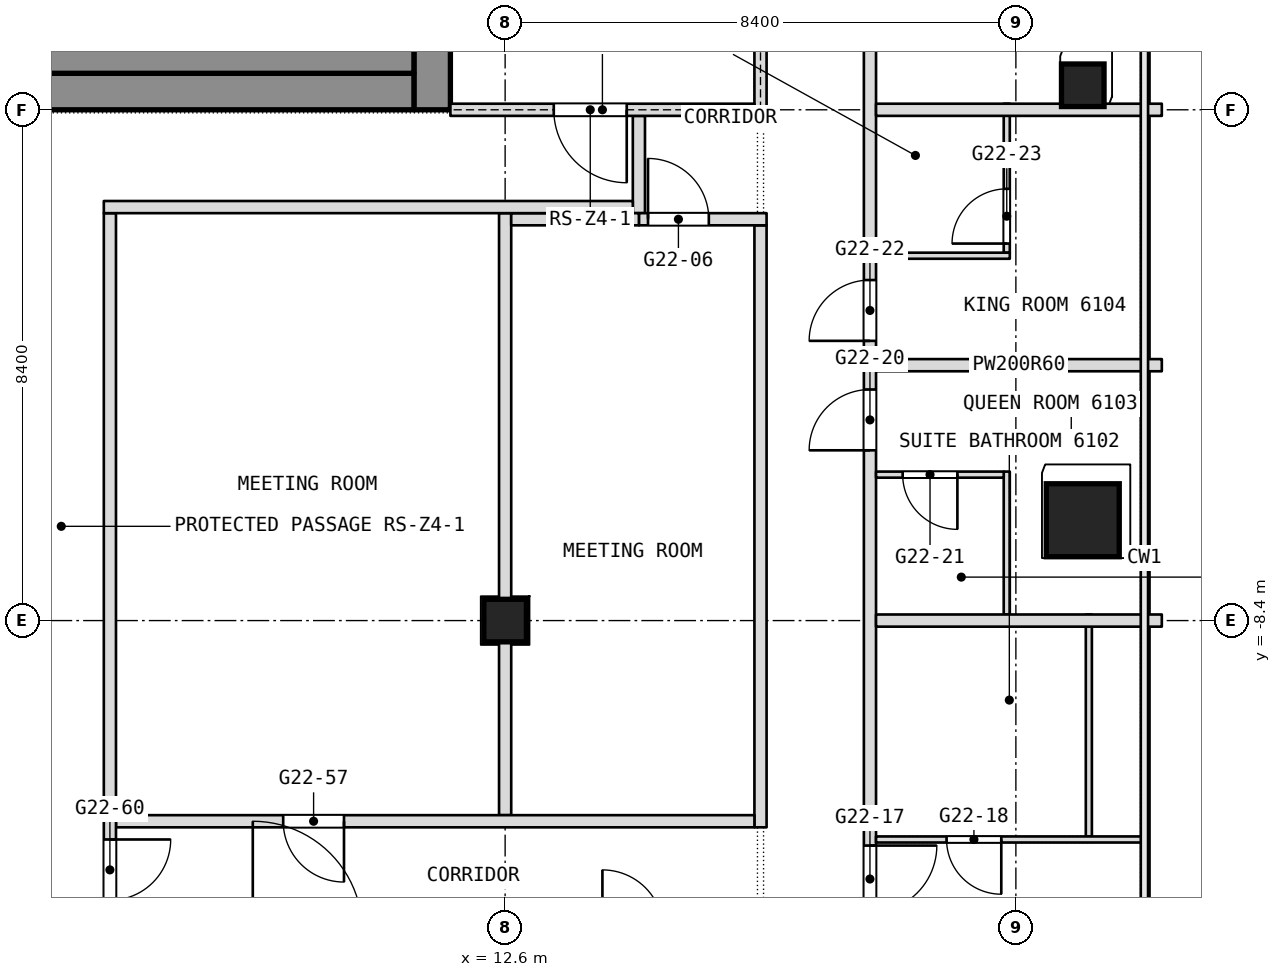
"""IFC4 building model, lengths in metres.
Left out: names, types, materials, properties, quantities, classifications, styles, units other than length and angle.
Written with IfcOpenShell. Run it as: python <this file> out.ifc"""

import sys

from ifc_helpers import new_model, si_unit, direction, frame, frame_2d, origin, origin_2d, place, context, subcontext, project, spatial, rectangle, extrude, element, fill, save


model = new_model("IFC4")
c1 = context("Model", 3, precision=1e-05, world=origin(), true_north=direction((0.0, 1.0)))
c2 = subcontext(c1, "Body", "Model", "MODEL_VIEW")
j1 = project(units=[si_unit("LENGTHUNIT", "METRE"), si_unit("PLANEANGLEUNIT", "RADIAN")], contexts=[c1])
p1 = place(None, origin())
s1 = spatial("IfcSite", under=j1, at=p1, CompositionType="ELEMENT")
p2 = place(p1, origin())
s2 = spatial("IfcBuilding", under=s1, at=p2, CompositionType="ELEMENT")
p3 = place(p2, frame((0.0, 0.0, 266.9)))
s3 = spatial("IfcBuildingStorey", under=s2, at=p3, CompositionType="ELEMENT", Elevation=266.9)
p4 = place(p3, frame((11.4, 0.0, 0.0), z_axis=(0.0, 0.0, 1.0), x_axis=(0.0, 1.0, 0.0)))
e1 = element("IfcWall", 1, at=p4, inside=s3, PredefinedType="SHEAR", context=c2, shape_type="SweptSolid", body=[
    extrude(rectangle(XDim=16.8, YDim=0.6, at=frame_2d((8.4, 0.0))), origin(), (0.0, 0.0, 1.0), 3.6),
])
p5 = place(p4, frame((2.3, 0.0, 0.0)))
e2 = element("IfcOpeningElement", 2, at=p5, cuts=e1, PredefinedType="OPENING", context=c2, shape_type="SweptSolid", body=[
    extrude(rectangle(XDim=1.1, YDim=2.1, at=frame_2d((0.55, 1.05))), frame((0.0, 0.3, 0.0), z_axis=(0.0, -1.0, 0.0), x_axis=(1.0, 0.0, 0.0)), (0.0, 0.0, 1.0), 0.6),
])
p6 = place(p4, frame((4.85, 0.0, 0.0)))
e3 = element("IfcOpeningElement", 3, at=p6, cuts=e1, PredefinedType="OPENING", context=c2, shape_type="SweptSolid", body=[
    extrude(rectangle(XDim=1.1, YDim=2.1, at=frame_2d((0.55, 1.05))), frame((0.0, 0.3, 0.0), z_axis=(0.0, -1.0, 0.0), x_axis=(1.0, 0.0, 0.0)), (0.0, 0.0, 1.0), 0.6),
])
p7 = place(p4, frame((6.825, 0.0, 0.0)))
e4 = element("IfcOpeningElement", 4, at=p7, cuts=e1, PredefinedType="OPENING", context=c2, shape_type="SweptSolid", body=[
    extrude(rectangle(XDim=1.2, YDim=2.1, at=frame_2d((0.6, 1.05))), frame((0.0, 0.3, 0.0), z_axis=(0.0, -1.0, 0.0), x_axis=(1.0, 0.0, 0.0)), (0.0, 0.0, 1.0), 0.6),
])
p8 = place(p4, frame((13.4, 0.0, 0.0)))
e5 = element("IfcOpeningElement", 5, at=p8, cuts=e1, PredefinedType="OPENING", context=c2, shape_type="SweptSolid", body=[
    extrude(rectangle(XDim=1.1, YDim=2.1, at=frame_2d((0.55, 1.05))), frame((0.0, 0.3, 0.0), z_axis=(0.0, -1.0, 0.0), x_axis=(1.0, 0.0, 0.0)), (0.0, 0.0, 1.0), 0.6),
])
p9 = place(p4, frame((10.85, 0.0, 0.0)))
e6 = element("IfcOpeningElement", 6, at=p9, cuts=e1, PredefinedType="OPENING", context=c2, shape_type="SweptSolid", body=[
    extrude(rectangle(XDim=1.1, YDim=2.1, at=frame_2d((0.55, 1.05))), frame((0.0, 0.3, 0.0), z_axis=(0.0, -1.0, 0.0), x_axis=(1.0, 0.0, 0.0)), (0.0, 0.0, 1.0), 0.6),
])
p10 = place(p4, frame((8.775, 0.0, 0.0)))
e7 = element("IfcOpeningElement", 7, at=p10, cuts=e1, PredefinedType="OPENING", context=c2, shape_type="SweptSolid", body=[
    extrude(rectangle(XDim=1.2, YDim=2.1, at=frame_2d((0.6, 1.05))), frame((0.0, 0.3, 0.0), z_axis=(0.0, -1.0, 0.0), x_axis=(1.0, 0.0, 0.0)), (0.0, 0.0, 1.0), 0.6),
])
p11 = place(p3, frame((-11.1, 0.3, 0.0), z_axis=(0.0, 0.0, 1.0), x_axis=(1.0, 0.0, 0.0)))
e8 = element("IfcWall", 8, at=p11, inside=s3, PredefinedType="SHEAR", context=c2, shape_type="SweptSolid", body=[
    extrude(rectangle(XDim=22.2, YDim=0.6, at=frame_2d((11.1, 0.0))), origin(), (0.0, 0.0, 1.0), 3.6),
])
p12 = place(p3, frame((22.1, -6.75, 0.0), z_axis=(0.0, 0.0, 1.0), x_axis=(1.0, 0.0, 0.0)))
e9 = element("IfcColumn", 9, at=p12, inside=s3, PredefinedType="COLUMN", context=c2, shape_type="SweptSolid", body=[
    extrude(rectangle(XDim=1.2, YDim=1.2, at=origin_2d()), origin(), (0.0, 0.0, 1.0), 3.6),
])
for number, where, z_axis, x_axis in (
    (10, (12.6, -8.4, 0.0), (0.0, 0.0, 1.0), (1.0, 0.0, 0.0)),
    (11, (22.1, 0.403, 0.0), (0.0, 0.0, 1.0), (1.0, 0.0, 0.0)),
):
    element("IfcColumn", number, at=place(p3, frame(where, z_axis=z_axis, x_axis=x_axis)), inside=s3, PredefinedType="COLUMN", context=c2, shape_type="SweptSolid", body=[
        extrude(rectangle(XDim=0.7, YDim=0.7, at=origin_2d()), origin(), (0.0, 0.0, 1.0), 3.6),
    ])
p13 = place(p3, frame((22.2, -11.95, 0.0), z_axis=(0.0, 0.0, 1.0), x_axis=(0.0, 1.0, 0.0)))
e12 = element("IfcWall", 12, at=p13, inside=s3, PredefinedType="PARTITIONING", context=c2, shape_type="SweptSolid", body=[
    extrude(rectangle(XDim=3.65, YDim=0.1, at=frame_2d((1.825, 0.0))), origin(), (0.0, 0.0, 1.0), 3.34),
])
p14 = place(p3, frame((20.85, -8.3, 0.0), z_axis=(0.0, 0.0, 1.0), x_axis=(0.0, 1.0, 0.0)))
e13 = element("IfcWall", 13, at=p14, inside=s3, PredefinedType="PARTITIONING", context=c2, shape_type="SweptSolid", body=[
    extrude(rectangle(XDim=2.35, YDim=0.1, at=frame_2d((1.175, 0.0))), origin(), (0.0, 0.0, 1.0), 3.34),
])
p15 = place(p3, frame((20.85, -2.35, 0.0), z_axis=(0.0, 0.0, 1.0), x_axis=(0.0, 1.0, 0.0)))
e14 = element("IfcWall", 14, at=p15, inside=s3, PredefinedType="PARTITIONING", context=c2, shape_type="SweptSolid", body=[
    extrude(rectangle(XDim=2.45, YDim=0.1, at=frame_2d((1.225, 0.0))), origin(), (0.0, 0.0, 1.0), 3.34),
])
p16 = place(p15, frame((0.15, 0.0, 0.0)))
e15 = element("IfcOpeningElement", 15, at=p16, cuts=e14, PredefinedType="OPENING", context=c2, shape_type="SweptSolid", body=[
    extrude(rectangle(XDim=0.9, YDim=2.1, at=frame_2d((0.45, 1.05))), frame((0.0, 0.05, 0.0), z_axis=(0.0, -1.0, 0.0), x_axis=(1.0, 0.0, 0.0)), (0.0, 0.0, 1.0), 0.1),
])
p17 = place(p3, frame((18.6, -31.794, 0.0), z_axis=(0.0, 0.0, 1.0), x_axis=(0.0, 1.0, 0.0)))
e16 = element("IfcWall", 16, at=p17, inside=s3, PredefinedType="PARTITIONING", context=c2, shape_type="SweptSolid", body=[
    extrude(rectangle(XDim=48.697, YDim=0.2, at=frame_2d((24.349, 0.0))), origin(), (0.0, 0.0, 1.0), 3.34),
])
p18 = place(p17, frame((7.097, 0.0, 0.0)))
e17 = element("IfcOpeningElement", 17, at=p18, cuts=e16, PredefinedType="OPENING", context=c2, shape_type="SweptSolid", body=[
    extrude(rectangle(XDim=1.1, YDim=2.1, at=frame_2d((0.55, 1.05))), frame((0.0, 0.1, 0.0), z_axis=(0.0, -1.0, 0.0), x_axis=(1.0, 0.0, 0.0)), (0.0, 0.0, 1.0), 0.2),
])
p19 = place(p17, frame((18.594, 0.0, 0.0)))
e18 = element("IfcOpeningElement", 18, at=p19, cuts=e16, PredefinedType="OPENING", context=c2, shape_type="SweptSolid", body=[
    extrude(rectangle(XDim=1.1, YDim=2.1, at=frame_2d((0.55, 1.05))), frame((0.0, 0.1, 0.0), z_axis=(0.0, -1.0, 0.0), x_axis=(1.0, 0.0, 0.0)), (0.0, 0.0, 1.0), 0.2),
])
p20 = place(p17, frame((26.194, 0.0, 0.0)))
e19 = element("IfcOpeningElement", 19, at=p20, cuts=e16, PredefinedType="OPENING", context=c2, shape_type="SweptSolid", body=[
    extrude(rectangle(XDim=1.0, YDim=2.1, at=frame_2d((0.5, 1.05))), frame((0.0, 0.1, 0.0), z_axis=(0.0, -1.0, 0.0), x_axis=(1.0, 0.0, 0.0)), (0.0, 0.0, 1.0), 0.2),
])
p21 = place(p17, frame((27.994, 0.0, 0.0)))
e20 = element("IfcOpeningElement", 20, at=p21, cuts=e16, PredefinedType="OPENING", context=c2, shape_type="SweptSolid", body=[
    extrude(rectangle(XDim=1.0, YDim=2.1, at=frame_2d((0.5, 1.05))), frame((0.0, 0.1, 0.0), z_axis=(0.0, -1.0, 0.0), x_axis=(1.0, 0.0, 0.0)), (0.0, 0.0, 1.0), 0.2),
])
p22 = place(p17, frame((35.094, 0.0, 0.0)))
e21 = element("IfcOpeningElement", 21, at=p22, cuts=e16, PredefinedType="OPENING", context=c2, shape_type="SweptSolid", body=[
    extrude(rectangle(XDim=1.8, YDim=2.1, at=frame_2d((0.9, 1.05))), frame((0.0, 0.1, 0.0), z_axis=(0.0, -1.0, 0.0), x_axis=(1.0, 0.0, 0.0)), (0.0, 0.0, 1.0), 0.2),
])
p23 = place(p17, frame((43.894, 0.0, 0.0)))
e22 = element("IfcOpeningElement", 22, at=p23, cuts=e16, PredefinedType="OPENING", context=c2, shape_type="SweptSolid", body=[
    extrude(rectangle(XDim=1.1, YDim=2.1, at=frame_2d((0.55, 1.05))), frame((0.0, 0.1, 0.0), z_axis=(0.0, -1.0, 0.0), x_axis=(1.0, 0.0, 0.0)), (0.0, 0.0, 1.0), 0.2),
])
p24 = place(p3, frame((16.8, -11.8, 0.0), z_axis=(0.0, 0.0, 1.0), x_axis=(0.0, 1.0, 0.0)))
e23 = element("IfcWall", 23, at=p24, inside=s3, PredefinedType="PARTITIONING", context=c2, shape_type="SweptSolid", body=[
    extrude(rectangle(XDim=9.9, YDim=0.2, at=frame_2d((4.95, 0.0))), origin(), (0.0, 0.0, 1.0), 3.34),
])
p25 = place(p3, frame((14.8, -1.7, 0.0), z_axis=(0.0, 0.0, 1.0), x_axis=(0.0, 1.0, 0.0)))
e24 = element("IfcWall", 24, at=p25, inside=s3, PredefinedType="PARTITIONING", context=c2, shape_type="SweptSolid", body=[
    extrude(rectangle(XDim=1.6, YDim=0.2, at=frame_2d((0.8, 0.0))), origin(), (0.0, 0.0, 1.0), 3.34),
])
p26 = place(p3, frame((12.6, -11.6, 0.0), z_axis=(0.0, 0.0, 1.0), x_axis=(0.0, 1.0, 0.0)))
e25 = element("IfcWall", 25, at=p26, inside=s3, PredefinedType="PARTITIONING", context=c2, shape_type="SweptSolid", body=[
    extrude(rectangle(XDim=9.9, YDim=0.2, at=frame_2d((4.95, 0.0))), origin(), (0.0, 0.0, 1.0), 3.34),
])
p27 = place(p3, frame((18.7, -12.0, 0.0), z_axis=(0.0, 0.0, 1.0), x_axis=(1.0, 0.0, 0.0)))
e26 = element("IfcWall", 26, at=p27, inside=s3, PredefinedType="PARTITIONING", context=c2, shape_type="SweptSolid", body=[
    extrude(rectangle(XDim=4.384, YDim=0.1, at=frame_2d((2.192, 0.0))), origin(), (0.0, 0.0, 1.0), 3.34),
])
p28 = place(p27, frame((1.16, 0.0, 0.0)))
e27 = element("IfcOpeningElement", 27, at=p28, cuts=e26, PredefinedType="OPENING", context=c2, shape_type="SweptSolid", body=[
    extrude(rectangle(XDim=0.9, YDim=2.1, at=frame_2d((0.45, 1.05))), frame((0.0, 0.05, 0.0), z_axis=(0.0, -1.0, 0.0), x_axis=(1.0, 0.0, 0.0)), (0.0, 0.0, 1.0), 0.1),
])
p29 = place(p3, frame((6.2, -11.7, 0.0), z_axis=(0.0, 0.0, 1.0), x_axis=(1.0, 0.0, 0.0)))
e28 = element("IfcWall", 28, at=p29, inside=s3, PredefinedType="PARTITIONING", context=c2, shape_type="SweptSolid", body=[
    extrude(rectangle(XDim=10.5, YDim=0.2, at=frame_2d((5.25, 0.0))), origin(), (0.0, 0.0, 1.0), 3.34),
])
p30 = place(p29, frame((2.75, 0.0, 0.0)))
e29 = element("IfcOpeningElement", 29, at=p30, cuts=e28, PredefinedType="OPENING", context=c2, shape_type="SweptSolid", body=[
    extrude(rectangle(XDim=1.0, YDim=2.1, at=frame_2d((0.5, 1.05))), frame((0.0, 0.1, 0.0), z_axis=(0.0, -1.0, 0.0), x_axis=(1.0, 0.0, 0.0)), (0.0, 0.0, 1.0), 0.2),
])
p31 = place(p3, frame((18.7, -8.4, 0.0), z_axis=(0.0, 0.0, 1.0), x_axis=(1.0, 0.0, 0.0)))
e30 = element("IfcWall", 30, at=p31, inside=s3, PredefinedType="PARTITIONING", context=c2, shape_type="SweptSolid", body=[
    extrude(rectangle(XDim=4.7, YDim=0.2, at=frame_2d((2.35, 0.0))), origin(), (0.0, 0.0, 1.0), 3.0),
])
p32 = place(p3, frame((6.1, -13.4, 0.0), z_axis=(0.0, 0.0, 1.0), x_axis=(0.0, 1.0, 0.0)))
e31 = element("IfcWall", 31, at=p32, inside=s3, PredefinedType="PARTITIONING", context=c2, shape_type="SweptSolid", body=[
    extrude(rectangle(XDim=1.8, YDim=0.2, at=frame_2d((0.9, 0.0))), origin(), (0.0, 0.0, 1.0), 3.34),
])
p33 = place(p32, frame((0.4, 0.0, 0.0)))
e32 = element("IfcOpeningElement", 32, at=p33, cuts=e31, PredefinedType="OPENING", context=c2, shape_type="SweptSolid", body=[
    extrude(rectangle(XDim=1.0, YDim=2.1, at=frame_2d((0.5, 1.05))), frame((0.0, 0.1, 0.0), z_axis=(0.0, -1.0, 0.0), x_axis=(1.0, 0.0, 0.0)), (0.0, 0.0, 1.0), 0.2),
])
p34 = place(p3, frame((6.1, -11.6, 0.0), z_axis=(0.0, 0.0, 1.0), x_axis=(0.0, 1.0, 0.0)))
e33 = element("IfcWall", 33, at=p34, inside=s3, PredefinedType="PARTITIONING", context=c2, shape_type="SweptSolid", body=[
    extrude(rectangle(XDim=9.9, YDim=0.2, at=frame_2d((4.95, 0.0))), origin(), (0.0, 0.0, 1.0), 3.34),
])
p35 = place(p3, frame((18.7, -6.0, 0.0), z_axis=(0.0, 0.0, 1.0), x_axis=(1.0, 0.0, 0.0)))
e34 = element("IfcWall", 34, at=p35, inside=s3, PredefinedType="PARTITIONING", context=c2, shape_type="SweptSolid", body=[
    extrude(rectangle(XDim=2.1, YDim=0.1, at=frame_2d((1.05, 0.0))), origin(), (0.0, 0.0, 1.0), 3.34),
])
p36 = place(p35, frame((0.438, 0.0, 0.0)))
e35 = element("IfcOpeningElement", 35, at=p36, cuts=e34, PredefinedType="OPENING", context=c2, shape_type="SweptSolid", body=[
    extrude(rectangle(XDim=0.9, YDim=2.1, at=frame_2d((0.45, 1.05))), frame((0.0, 0.05, 0.0), z_axis=(0.0, -1.0, 0.0), x_axis=(1.0, 0.0, 0.0)), (0.0, 0.0, 1.0), 0.1),
])
p37 = place(p3, frame((18.7, -4.2, 0.0), z_axis=(0.0, 0.0, 1.0), x_axis=(1.0, 0.0, 0.0)))
e36 = element("IfcWall", 36, at=p37, inside=s3, PredefinedType="PARTITIONING", context=c2, shape_type="SweptSolid", body=[
    extrude(rectangle(XDim=4.7, YDim=0.2, at=frame_2d((2.35, 0.0))), origin(), (0.0, 0.0, 1.0), 3.34),
])
p38 = place(p3, frame((18.7, -2.4, 0.0), z_axis=(0.0, 0.0, 1.0), x_axis=(1.0, 0.0, 0.0)))
e37 = element("IfcWall", 37, at=p38, inside=s3, PredefinedType="PARTITIONING", context=c2, shape_type="SweptSolid", body=[
    extrude(rectangle(XDim=2.2, YDim=0.1, at=frame_2d((1.1, 0.0))), origin(), (0.0, 0.0, 1.0), 3.34),
])
p39 = place(p3, frame((14.8, -1.8, 0.0), z_axis=(0.0, 0.0, 1.0), x_axis=(1.0, 0.0, 0.0)))
e38 = element("IfcWall", 38, at=p39, inside=s3, PredefinedType="PARTITIONING", context=c2, shape_type="SweptSolid", body=[
    extrude(rectangle(XDim=2.1, YDim=0.2, at=frame_2d((1.05, 0.0))), origin(), (0.0, 0.0, 1.0), 3.34),
])
p40 = place(p39, frame((0.15, 0.0, 0.0)))
e39 = element("IfcOpeningElement", 39, at=p40, cuts=e38, PredefinedType="OPENING", context=c2, shape_type="SweptSolid", body=[
    extrude(rectangle(XDim=1.0, YDim=2.1, at=frame_2d((0.5, 1.05))), frame((0.0, 0.1, 0.0), z_axis=(0.0, -1.0, 0.0), x_axis=(1.0, 0.0, 0.0)), (0.0, 0.0, 1.0), 0.2),
])
p41 = place(p3, frame((12.7, -1.8, 0.0), z_axis=(0.0, 0.0, 1.0), x_axis=(1.0, 0.0, 0.0)))
e40 = element("IfcWall", 40, at=p41, inside=s3, PredefinedType="PARTITIONING", context=c2, shape_type="SweptSolid", body=[
    extrude(rectangle(XDim=2.1, YDim=0.2, at=frame_2d((1.05, 0.0))), origin(), (0.0, 0.0, 1.0), 3.34),
])
p42 = place(p3, frame((6.0, -1.6, 0.0), z_axis=(0.0, 0.0, 1.0), x_axis=(1.0, 0.0, 0.0)))
e41 = element("IfcWall", 41, at=p42, inside=s3, PredefinedType="PARTITIONING", context=c2, shape_type="SweptSolid", body=[
    extrude(rectangle(XDim=8.7, YDim=0.2, at=frame_2d((4.35, 0.0))), origin(), (0.0, 0.0, 1.0), 3.34),
])
p43 = place(p3, frame((18.7, 0.0, 0.0), z_axis=(0.0, 0.0, 1.0), x_axis=(1.0, 0.0, 0.0)))
e42 = element("IfcWall", 42, at=p43, inside=s3, PredefinedType="PARTITIONING", context=c2, shape_type="SweptSolid", body=[
    extrude(rectangle(XDim=4.7, YDim=0.2, at=frame_2d((2.35, 0.0))), origin(), (0.0, 0.0, 1.0), 3.0),
])
p44 = place(p3, frame((-11.1, 1.05, 0.0), z_axis=(0.0, 0.0, 1.0), x_axis=(1.0, 0.0, 0.0)))
e43 = element("IfcWall", 43, at=p44, inside=s3, PredefinedType="PARTITIONING", context=c2, shape_type="SweptSolid", body=[
    extrude(rectangle(XDim=22.2, YDim=0.9, at=frame_2d((11.1, 0.0))), origin(), (0.0, 0.0, 1.0), 3.34),
])
p45 = place(p3, frame((16.8, -0.1, 0.0), z_axis=(0.0, 0.0, 1.0), x_axis=(0.0, 1.0, 0.0)))
e44 = element("IfcWall", 44, at=p45, inside=s3, PredefinedType="PARTITIONING", context=c2, shape_type="SweptSolid", body=[
    extrude(rectangle(XDim=17.0, YDim=0.2, at=frame_2d((8.5, 0.0))), origin(), (0.0, 0.0, 1.0), 3.34),
])
p46 = place(p45, frame((2.2, 0.0, 0.0)))
e45 = element("IfcOpeningElement", 45, at=p46, cuts=e44, PredefinedType="OPENING", context=c2, shape_type="SweptSolid", body=[
    extrude(rectangle(XDim=1.8, YDim=2.1, at=frame_2d((0.9, 1.05))), frame((0.0, 0.1, 0.0), z_axis=(0.0, -1.0, 0.0), x_axis=(1.0, 0.0, 0.0)), (0.0, 0.0, 1.0), 0.2),
])
p47 = place(p45, frame((13.0, 0.0, 0.0)))
e46 = element("IfcOpeningElement", 46, at=p47, cuts=e44, PredefinedType="OPENING", context=c2, shape_type="SweptSolid", body=[
    extrude(rectangle(XDim=1.8, YDim=2.1, at=frame_2d((0.9, 1.05))), frame((0.0, 0.1, 0.0), z_axis=(0.0, -1.0, 0.0), x_axis=(1.0, 0.0, 0.0)), (0.0, 0.0, 1.0), 0.2),
])
p48 = place(p3, frame((11.7, 0.0, 0.0), z_axis=(0.0, 0.0, 1.0), x_axis=(1.0, 0.0, 0.0)))
e47 = element("IfcWall", 47, at=p48, inside=s3, PredefinedType="PARTITIONING", context=c2, shape_type="SweptSolid", body=[
    extrude(rectangle(XDim=5.0, YDim=0.2, at=frame_2d((2.5, 0.0))), origin(), (0.0, 0.0, 1.0), 3.0),
])
p49 = place(p48, frame((1.7, 0.0, 0.0)))
e48 = element("IfcOpeningElement", 48, at=p49, cuts=e47, PredefinedType="OPENING", context=c2, shape_type="SweptSolid", body=[
    extrude(rectangle(XDim=1.2, YDim=2.1, at=frame_2d((0.6, 1.05))), frame((0.0, 0.1, 0.0), z_axis=(0.0, -1.0, 0.0), x_axis=(1.0, 0.0, 0.0)), (0.0, 0.0, 1.0), 0.2),
])
p50 = place(p16, origin())
e49 = element("IfcDoor", 49, at=p50, inside=s3, OperationType="SINGLE_SWING_LEFT", PredefinedType="DOOR", context=c2, shape_type="SweptSolid", body=[
    extrude(rectangle(XDim=0.9, YDim=2.1, at=frame_2d((0.45, 1.05))), frame((0.0, 0.025, 0.0), z_axis=(0.0, -1.0, 0.0), x_axis=(1.0, 0.0, 0.0)), (0.0, 0.0, 1.0), 0.05),
])
fill(e15, e49)
p51 = place(p19, origin())
e50 = element("IfcDoor", 50, at=p51, inside=s3, OperationType="SINGLE_SWING_LEFT", PredefinedType="DOOR", context=c2, shape_type="SweptSolid", body=[
    extrude(rectangle(XDim=1.1, YDim=2.1, at=frame_2d((0.55, 1.05))), frame((0.0, 0.025, 0.0), z_axis=(0.0, -1.0, 0.0), x_axis=(1.0, 0.0, 0.0)), (0.0, 0.0, 1.0), 0.05),
])
fill(e18, e50)
p52 = place(p20, origin())
e51 = element("IfcDoor", 51, at=p52, inside=s3, OperationType="SINGLE_SWING_RIGHT", PredefinedType="DOOR", context=c2, shape_type="SweptSolid", body=[
    extrude(rectangle(XDim=1.0, YDim=2.1, at=frame_2d((0.5, 1.05))), frame((0.0, 0.025, 0.0), z_axis=(0.0, -1.0, 0.0), x_axis=(1.0, 0.0, 0.0)), (0.0, 0.0, 1.0), 0.05),
])
fill(e19, e51)
p53 = place(p21, origin())
e52 = element("IfcDoor", 52, at=p53, inside=s3, OperationType="SINGLE_SWING_RIGHT", PredefinedType="DOOR", context=c2, shape_type="SweptSolid", body=[
    extrude(rectangle(XDim=1.0, YDim=2.1, at=frame_2d((0.5, 1.05))), frame((0.0, 0.025, 0.0), z_axis=(0.0, -1.0, 0.0), x_axis=(1.0, 0.0, 0.0)), (0.0, 0.0, 1.0), 0.05),
])
fill(e20, e52)
p54 = place(p28, origin())
e53 = element("IfcDoor", 53, at=p54, inside=s3, OperationType="SINGLE_SWING_LEFT", PredefinedType="DOOR", context=c2, shape_type="SweptSolid", body=[
    extrude(rectangle(XDim=0.9, YDim=2.1, at=frame_2d((0.45, 1.05))), frame((0.0, 0.025, 0.0), z_axis=(0.0, -1.0, 0.0), x_axis=(1.0, 0.0, 0.0)), (0.0, 0.0, 1.0), 0.05),
])
fill(e27, e53)
p55 = place(p30, origin())
e54 = element("IfcDoor", 54, at=p55, inside=s3, OperationType="SINGLE_SWING_LEFT", PredefinedType="DOOR", context=c2, shape_type="SweptSolid", body=[
    extrude(rectangle(XDim=1.0, YDim=2.1, at=frame_2d((0.5, 1.05))), frame((0.0, 0.025, 0.0), z_axis=(0.0, -1.0, 0.0), x_axis=(1.0, 0.0, 0.0)), (0.0, 0.0, 1.0), 0.05),
])
fill(e29, e54)
p56 = place(p33, origin())
e55 = element("IfcDoor", 55, at=p56, inside=s3, OperationType="SINGLE_SWING_RIGHT", PredefinedType="DOOR", context=c2, shape_type="SweptSolid", body=[
    extrude(rectangle(XDim=1.0, YDim=2.1, at=frame_2d((0.5, 1.05))), frame((0.0, 0.025, 0.0), z_axis=(0.0, -1.0, 0.0), x_axis=(1.0, 0.0, 0.0)), (0.0, 0.0, 1.0), 0.05),
])
fill(e32, e55)
p57 = place(p36, origin())
e56 = element("IfcDoor", 56, at=p57, inside=s3, OperationType="SINGLE_SWING_RIGHT", PredefinedType="DOOR", context=c2, shape_type="SweptSolid", body=[
    extrude(rectangle(XDim=0.9, YDim=2.1, at=frame_2d((0.45, 1.05))), frame((0.0, 0.025, 0.0), z_axis=(0.0, -1.0, 0.0), x_axis=(1.0, 0.0, 0.0)), (0.0, 0.0, 1.0), 0.05),
])
fill(e35, e56)
p58 = place(p40, origin())
e57 = element("IfcDoor", 57, at=p58, inside=s3, OperationType="SINGLE_SWING_LEFT", PredefinedType="DOOR", context=c2, shape_type="SweptSolid", body=[
    extrude(rectangle(XDim=1.0, YDim=2.1, at=frame_2d((0.5, 1.05))), frame((0.0, 0.025, 0.0), z_axis=(0.0, -1.0, 0.0), x_axis=(1.0, 0.0, 0.0)), (0.0, 0.0, 1.0), 0.05),
])
fill(e39, e57)
p59 = place(p49, origin())
e58 = element("IfcDoor", 58, at=p59, inside=s3, OperationType="SINGLE_SWING_LEFT", PredefinedType="DOOR", context=c2, shape_type="SweptSolid", body=[
    extrude(rectangle(XDim=1.2, YDim=2.1, at=frame_2d((0.6, 1.05))), frame((0.0, 0.025, 0.0), z_axis=(0.0, -1.0, 0.0), x_axis=(1.0, 0.0, 0.0)), (0.0, 0.0, 1.0), 0.05),
])
fill(e48, e58)
save(model, sys.argv[1])
